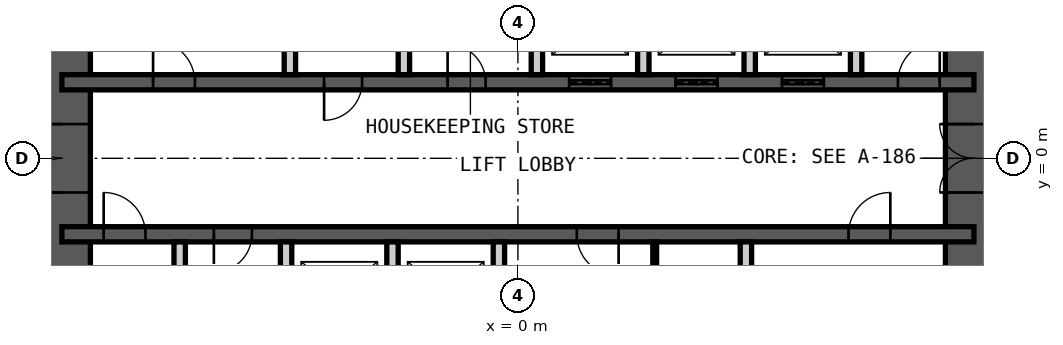
"""IFC4 building model, lengths in metres.
Left out: names, types, materials, properties, quantities, classifications, styles, units other than length and angle.
Written with IfcOpenShell. Run it as: python <this file> out.ifc"""

import sys

from ifc_helpers import new_model, si_unit, direction, frame, frame_2d, origin, place, context, subcontext, project, spatial, rectangle, extrude, element, fill, save


model = new_model("IFC4")
c1 = context("Model", 3, precision=1e-05, world=origin(), true_north=direction((0.0, 1.0)))
c2 = subcontext(c1, "Body", "Model", "MODEL_VIEW")
j1 = project(units=[si_unit("LENGTHUNIT", "METRE"), si_unit("PLANEANGLEUNIT", "RADIAN")], contexts=[c1])
p1 = place(None, origin())
s1 = spatial("IfcSite", under=j1, at=p1, CompositionType="ELEMENT")
p2 = place(p1, origin())
s2 = spatial("IfcBuilding", under=s1, at=p2, CompositionType="ELEMENT")
p3 = place(p2, frame((0.0, 0.0, 153.4)))
s3 = spatial("IfcBuildingStorey", under=s2, at=p3, CompositionType="ELEMENT", Elevation=153.4)
p4 = place(p3, frame((12.0, -9.0, 0.0), z_axis=(0.0, 0.0, 1.0), x_axis=(0.0, 1.0, 0.0)))
e1 = element("IfcWall", 1, at=p4, inside=s3, PredefinedType="SHEAR", context=c2, shape_type="SweptSolid", body=[
    extrude(rectangle(XDim=18.0, YDim=1.5, at=frame_2d((9.0, 0.0))), origin(), (0.0, 0.0, 1.0), 4.2),
])
p5 = place(p4, frame((8.1, 0.0, 0.0)))
e2 = element("IfcOpeningElement", 2, at=p5, cuts=e1, PredefinedType="OPENING", context=c2, shape_type="SweptSolid", body=[
    extrude(rectangle(XDim=1.8, YDim=2.1, at=frame_2d((0.9, 1.05))), frame((0.0, 0.76, 0.0), z_axis=(0.0, -1.0, 0.0), x_axis=(1.0, 0.0, 0.0)), (0.0, 0.0, 1.0), 1.52),
])
p6 = place(p3, frame((-12.0, -9.0, 0.0), z_axis=(0.0, 0.0, 1.0), x_axis=(0.0, 1.0, 0.0)))
e3 = element("IfcWall", 3, at=p6, inside=s3, PredefinedType="SHEAR", context=c2, shape_type="SweptSolid", body=[
    extrude(rectangle(XDim=18.0, YDim=1.5, at=frame_2d((9.0, 0.0))), origin(), (0.0, 0.0, 1.0), 4.2),
])
p7 = place(p6, frame((8.1, 0.0, 0.0)))
e4 = element("IfcOpeningElement", 4, at=p7, cuts=e3, PredefinedType="OPENING", context=c2, shape_type="SweptSolid", body=[
    extrude(rectangle(XDim=1.8, YDim=2.1, at=frame_2d((0.9, 1.05))), frame((0.0, 0.76, 0.0), z_axis=(0.0, -1.0, 0.0), x_axis=(1.0, 0.0, 0.0)), (0.0, 0.0, 1.0), 1.52),
])
p8 = place(p3, frame((-12.0, 2.0, 0.0), z_axis=(0.0, 0.0, 1.0), x_axis=(1.0, 0.0, 0.0)))
e5 = element("IfcWall", 5, at=p8, inside=s3, PredefinedType="SHEAR", context=c2, shape_type="SweptSolid", body=[
    extrude(rectangle(XDim=24.0, YDim=0.4, at=frame_2d((12.0, 0.0))), origin(), (0.0, 0.0, 1.0), 4.2),
])
p9 = place(p8, frame((2.4, 0.0, 0.0)))
e6 = element("IfcOpeningElement", 6, at=p9, cuts=e5, PredefinedType="OPENING", context=c2, shape_type="SweptSolid", body=[
    extrude(rectangle(XDim=1.1, YDim=2.1, at=frame_2d((0.55, 1.05))), frame((0.0, 0.21, 0.0), z_axis=(0.0, -1.0, 0.0), x_axis=(1.0, 0.0, 0.0)), (0.0, 0.0, 1.0), 0.42),
])
p10 = place(p8, frame((22.0, 0.0, 0.0)))
e7 = element("IfcOpeningElement", 7, at=p10, cuts=e5, PredefinedType="OPENING", context=c2, shape_type="SweptSolid", body=[
    extrude(rectangle(XDim=1.1, YDim=2.1, at=frame_2d((0.55, 1.05))), frame((0.0, 0.21, 0.0), z_axis=(0.0, -1.0, 0.0), x_axis=(1.0, 0.0, 0.0)), (0.0, 0.0, 1.0), 0.42),
])
p11 = place(p8, frame((10.15, 0.0, 0.0)))
e8 = element("IfcOpeningElement", 8, at=p11, cuts=e5, PredefinedType="OPENING", context=c2, shape_type="SweptSolid", body=[
    extrude(rectangle(XDim=1.0, YDim=2.1, at=frame_2d((0.5, 1.05))), frame((0.0, 0.21, 0.0), z_axis=(0.0, -1.0, 0.0), x_axis=(1.0, 0.0, 0.0)), (0.0, 0.0, 1.0), 0.42),
])
p12 = place(p8, frame((6.9, 0.0, 0.0)))
e9 = element("IfcOpeningElement", 9, at=p12, cuts=e5, PredefinedType="OPENING", context=c2, shape_type="SweptSolid", body=[
    extrude(rectangle(XDim=1.0, YDim=2.1, at=frame_2d((0.5, 1.05))), frame((0.0, 0.21, 0.0), z_axis=(0.0, -1.0, 0.0), x_axis=(1.0, 0.0, 0.0)), (0.0, 0.0, 1.0), 0.42),
])
p13 = place(p8, frame((13.35, 0.0, 0.0)))
e10 = element("IfcOpeningElement", 10, at=p13, cuts=e5, PredefinedType="OPENING", context=c2, shape_type="SweptSolid", body=[
    extrude(rectangle(XDim=1.1, YDim=2.4, at=frame_2d((0.55, 1.2))), frame((0.0, 0.21, 0.0), z_axis=(0.0, -1.0, 0.0), x_axis=(1.0, 0.0, 0.0)), (0.0, 0.0, 1.0), 0.42),
])
p14 = place(p8, frame((16.15, 0.0, 0.0)))
e11 = element("IfcOpeningElement", 11, at=p14, cuts=e5, PredefinedType="OPENING", context=c2, shape_type="SweptSolid", body=[
    extrude(rectangle(XDim=1.1, YDim=2.4, at=frame_2d((0.55, 1.2))), frame((0.0, 0.21, 0.0), z_axis=(0.0, -1.0, 0.0), x_axis=(1.0, 0.0, 0.0)), (0.0, 0.0, 1.0), 0.42),
])
p15 = place(p8, frame((18.95, 0.0, 0.0)))
e12 = element("IfcOpeningElement", 12, at=p15, cuts=e5, PredefinedType="OPENING", context=c2, shape_type="SweptSolid", body=[
    extrude(rectangle(XDim=1.1, YDim=2.4, at=frame_2d((0.55, 1.2))), frame((0.0, 0.21, 0.0), z_axis=(0.0, -1.0, 0.0), x_axis=(1.0, 0.0, 0.0)), (0.0, 0.0, 1.0), 0.42),
])
p16 = place(p3, frame((-12.0, -2.0, 0.0), z_axis=(0.0, 0.0, 1.0), x_axis=(1.0, 0.0, 0.0)))
e13 = element("IfcWall", 13, at=p16, inside=s3, PredefinedType="SHEAR", context=c2, shape_type="SweptSolid", body=[
    extrude(rectangle(XDim=24.0, YDim=0.4, at=frame_2d((12.0, 0.0))), origin(), (0.0, 0.0, 1.0), 4.2),
])
p17 = place(p16, frame((1.1, 0.0, 0.0)))
e14 = element("IfcOpeningElement", 14, at=p17, cuts=e13, PredefinedType="OPENING", context=c2, shape_type="SweptSolid", body=[
    extrude(rectangle(XDim=1.1, YDim=2.1, at=frame_2d((0.55, 1.05))), frame((0.0, 0.21, 0.0), z_axis=(0.0, -1.0, 0.0), x_axis=(1.0, 0.0, 0.0)), (0.0, 0.0, 1.0), 0.42),
])
p18 = place(p16, frame((13.55, 0.0, 0.0)))
e15 = element("IfcOpeningElement", 15, at=p18, cuts=e13, PredefinedType="OPENING", context=c2, shape_type="SweptSolid", body=[
    extrude(rectangle(XDim=1.1, YDim=2.1, at=frame_2d((0.55, 1.05))), frame((0.0, 0.21, 0.0), z_axis=(0.0, -1.0, 0.0), x_axis=(1.0, 0.0, 0.0)), (0.0, 0.0, 1.0), 0.42),
])
p19 = place(p16, frame((20.7, 0.0, 0.0)))
e16 = element("IfcOpeningElement", 16, at=p19, cuts=e13, PredefinedType="OPENING", context=c2, shape_type="SweptSolid", body=[
    extrude(rectangle(XDim=1.1, YDim=2.1, at=frame_2d((0.55, 1.05))), frame((0.0, 0.21, 0.0), z_axis=(0.0, -1.0, 0.0), x_axis=(1.0, 0.0, 0.0)), (0.0, 0.0, 1.0), 0.42),
])
p20 = place(p16, frame((4.0, 0.0, 0.0)))
e17 = element("IfcOpeningElement", 17, at=p20, cuts=e13, PredefinedType="OPENING", context=c2, shape_type="SweptSolid", body=[
    extrude(rectangle(XDim=1.0, YDim=2.1, at=frame_2d((0.5, 1.05))), frame((0.0, 0.21, 0.0), z_axis=(0.0, -1.0, 0.0), x_axis=(1.0, 0.0, 0.0)), (0.0, 0.0, 1.0), 0.42),
])
for number, where, z_axis, x_axis in (
    (18, (-6.0, 2.2, 0.0), (0.0, 0.0, 1.0), (0.0, 1.0, 0.0)),
    (19, (-3.0, 2.2, 0.0), (0.0, 0.0, 1.0), (0.0, 1.0, 0.0)),
    (20, (0.5, 2.2, 0.0), (0.0, 0.0, 1.0), (0.0, 1.0, 0.0)),
    (21, (3.3, 2.2, 0.0), (0.0, 0.0, 1.0), (0.0, 1.0, 0.0)),
    (22, (6.1, 2.2, 0.0), (0.0, 0.0, 1.0), (0.0, 1.0, 0.0)),
    (23, (8.9, 2.2, 0.0), (0.0, 0.0, 1.0), (0.0, 1.0, 0.0)),
    (24, (-8.9, -4.85, 0.0), (0.0, 0.0, 1.0), (0.0, 1.0, 0.0)),
    (25, (-6.1, -4.85, 0.0), (0.0, 0.0, 1.0), (0.0, 1.0, 0.0)),
    (26, (-3.3, -4.85, 0.0), (0.0, 0.0, 1.0), (0.0, 1.0, 0.0)),
    (27, (-0.5, -4.85, 0.0), (0.0, 0.0, 1.0), (0.0, 1.0, 0.0)),
    (28, (6.0, -4.85, 0.0), (0.0, 0.0, 1.0), (0.0, 1.0, 0.0)),
):
    element("IfcWall", number, at=place(p3, frame(where, z_axis=z_axis, x_axis=x_axis)), inside=s3, PredefinedType="PARTITIONING", context=c2, shape_type="SweptSolid", body=[
        extrude(rectangle(XDim=2.65, YDim=0.3, at=frame_2d((1.325, 0.0))), origin(), (0.0, 0.0, 1.0), 3.98),
    ])
p21 = place(p3, frame((3.6, -4.85, 0.0), z_axis=(0.0, 0.0, 1.0), x_axis=(0.0, 1.0, 0.0)))
e29 = element("IfcWall", 29, at=p21, inside=s3, PredefinedType="PARTITIONING", context=c2, shape_type="SweptSolid", body=[
    extrude(rectangle(XDim=2.65, YDim=0.1, at=frame_2d((1.325, 0.0))), origin(), (0.0, 0.0, 1.0), 3.98),
])
p22 = place(p21, frame((0.1, 0.0, 0.0)))
e30 = element("IfcOpeningElement", 30, at=p22, cuts=e29, PredefinedType="OPENING", context=c2, shape_type="SweptSolid", body=[
    extrude(rectangle(XDim=1.0, YDim=2.4, at=frame_2d((0.5, 1.2))), frame((0.0, 0.06, 0.0), z_axis=(0.0, -1.0, 0.0), x_axis=(1.0, 0.0, 0.0)), (0.0, 0.0, 1.0), 0.12),
])
p23 = place(p9, origin())
e31 = element("IfcDoor", 31, at=p23, inside=s3, OperationType="SINGLE_SWING_RIGHT", PredefinedType="DOOR", context=c2, shape_type="SweptSolid", body=[
    extrude(rectangle(XDim=1.1, YDim=2.1, at=frame_2d((0.55, 1.05))), frame((0.0, 0.025, 0.0), z_axis=(0.0, -1.0, 0.0), x_axis=(1.0, 0.0, 0.0)), (0.0, 0.0, 1.0), 0.05),
])
fill(e6, e31)
p24 = place(p17, origin())
e32 = element("IfcDoor", 32, at=p24, inside=s3, OperationType="SINGLE_SWING_RIGHT", PredefinedType="DOOR", context=c2, shape_type="SweptSolid", body=[
    extrude(rectangle(XDim=1.1, YDim=2.1, at=frame_2d((0.55, 1.05))), frame((0.0, 0.025, 0.0), z_axis=(0.0, -1.0, 0.0), x_axis=(1.0, 0.0, 0.0)), (0.0, 0.0, 1.0), 0.05),
])
fill(e14, e32)
p25 = place(p10, origin())
e33 = element("IfcDoor", 33, at=p25, inside=s3, OperationType="SINGLE_SWING_LEFT", PredefinedType="DOOR", context=c2, shape_type="SweptSolid", body=[
    extrude(rectangle(XDim=1.1, YDim=2.1, at=frame_2d((0.55, 1.05))), frame((0.0, 0.025, 0.0), z_axis=(0.0, -1.0, 0.0), x_axis=(1.0, 0.0, 0.0)), (0.0, 0.0, 1.0), 0.05),
])
fill(e7, e33)
p26 = place(p11, origin())
e34 = element("IfcDoor", 34, at=p26, inside=s3, OperationType="SINGLE_SWING_RIGHT", PredefinedType="DOOR", context=c2, shape_type="SweptSolid", body=[
    extrude(rectangle(XDim=1.0, YDim=2.1, at=frame_2d((0.5, 1.05))), frame((0.0, 0.025, 0.0), z_axis=(0.0, -1.0, 0.0), x_axis=(1.0, 0.0, 0.0)), (0.0, 0.0, 1.0), 0.05),
])
fill(e8, e34)
p27 = place(p18, origin())
e35 = element("IfcDoor", 35, at=p27, inside=s3, OperationType="SINGLE_SWING_RIGHT", PredefinedType="DOOR", context=c2, shape_type="SweptSolid", body=[
    extrude(rectangle(XDim=1.1, YDim=2.1, at=frame_2d((0.55, 1.05))), frame((0.0, 0.025, 0.0), z_axis=(0.0, -1.0, 0.0), x_axis=(1.0, 0.0, 0.0)), (0.0, 0.0, 1.0), 0.05),
])
fill(e15, e35)
p28 = place(p19, origin())
e36 = element("IfcDoor", 36, at=p28, inside=s3, OperationType="SINGLE_SWING_LEFT", PredefinedType="DOOR", context=c2, shape_type="SweptSolid", body=[
    extrude(rectangle(XDim=1.1, YDim=2.1, at=frame_2d((0.55, 1.05))), frame((0.0, 0.025, 0.0), z_axis=(0.0, -1.0, 0.0), x_axis=(1.0, 0.0, 0.0)), (0.0, 0.0, 1.0), 0.05),
])
fill(e16, e36)
p29 = place(p5, origin())
e37 = element("IfcDoor", 37, at=p29, inside=s3, OperationType="DOUBLE_DOOR_DOUBLE_SWING", PredefinedType="DOOR", context=c2, shape_type="SweptSolid", body=[
    extrude(rectangle(XDim=1.8, YDim=2.1, at=frame_2d((0.9, 1.05))), frame((0.0, 0.025, 0.0), z_axis=(0.0, -1.0, 0.0), x_axis=(1.0, 0.0, 0.0)), (0.0, 0.0, 1.0), 0.05),
])
fill(e2, e37)
p30 = place(p7, origin())
e38 = element("IfcDoor", 38, at=p30, inside=s3, OperationType="DOUBLE_DOOR_DOUBLE_SWING", PredefinedType="DOOR", context=c2, shape_type="SweptSolid", body=[
    extrude(rectangle(XDim=1.8, YDim=2.1, at=frame_2d((0.9, 1.05))), frame((0.0, 0.025, 0.0), z_axis=(0.0, -1.0, 0.0), x_axis=(1.0, 0.0, 0.0)), (0.0, 0.0, 1.0), 0.05),
])
fill(e4, e38)
p31 = place(p12, origin())
e39 = element("IfcDoor", 39, at=p31, inside=s3, OperationType="SINGLE_SWING_LEFT", PredefinedType="DOOR", context=c2, shape_type="SweptSolid", body=[
    extrude(rectangle(XDim=1.0, YDim=2.1, at=frame_2d((0.5, 1.05))), frame((0.0, 0.025, 0.0), z_axis=(0.0, -1.0, 0.0), x_axis=(1.0, 0.0, 0.0)), (0.0, 0.0, 1.0), 0.05),
])
fill(e9, e39)
p32 = place(p13, origin())
e40 = element("IfcDoor", 40, at=p32, inside=s3, OperationType="DOUBLE_DOOR_SLIDING", PredefinedType="DOOR", context=c2, shape_type="SweptSolid", body=[
    extrude(rectangle(XDim=1.1, YDim=2.4, at=frame_2d((0.55, 1.2))), frame((0.0, 0.025, 0.0), z_axis=(0.0, -1.0, 0.0), x_axis=(1.0, 0.0, 0.0)), (0.0, 0.0, 1.0), 0.05),
])
fill(e10, e40)
p33 = place(p14, origin())
e41 = element("IfcDoor", 41, at=p33, inside=s3, OperationType="DOUBLE_DOOR_SLIDING", PredefinedType="DOOR", context=c2, shape_type="SweptSolid", body=[
    extrude(rectangle(XDim=1.1, YDim=2.4, at=frame_2d((0.55, 1.2))), frame((0.0, 0.025, 0.0), z_axis=(0.0, -1.0, 0.0), x_axis=(1.0, 0.0, 0.0)), (0.0, 0.0, 1.0), 0.05),
])
fill(e11, e41)
p34 = place(p15, origin())
e42 = element("IfcDoor", 42, at=p34, inside=s3, OperationType="DOUBLE_DOOR_SLIDING", PredefinedType="DOOR", context=c2, shape_type="SweptSolid", body=[
    extrude(rectangle(XDim=1.1, YDim=2.4, at=frame_2d((0.55, 1.2))), frame((0.0, 0.025, 0.0), z_axis=(0.0, -1.0, 0.0), x_axis=(1.0, 0.0, 0.0)), (0.0, 0.0, 1.0), 0.05),
])
fill(e12, e42)
p35 = place(p20, origin())
e43 = element("IfcDoor", 43, at=p35, inside=s3, OperationType="SINGLE_SWING_LEFT", PredefinedType="DOOR", context=c2, shape_type="SweptSolid", body=[
    extrude(rectangle(XDim=1.0, YDim=2.1, at=frame_2d((0.5, 1.05))), frame((0.0, 0.025, 0.0), z_axis=(0.0, -1.0, 0.0), x_axis=(1.0, 0.0, 0.0)), (0.0, 0.0, 1.0), 0.05),
])
fill(e17, e43)
save(model, sys.argv[1])
